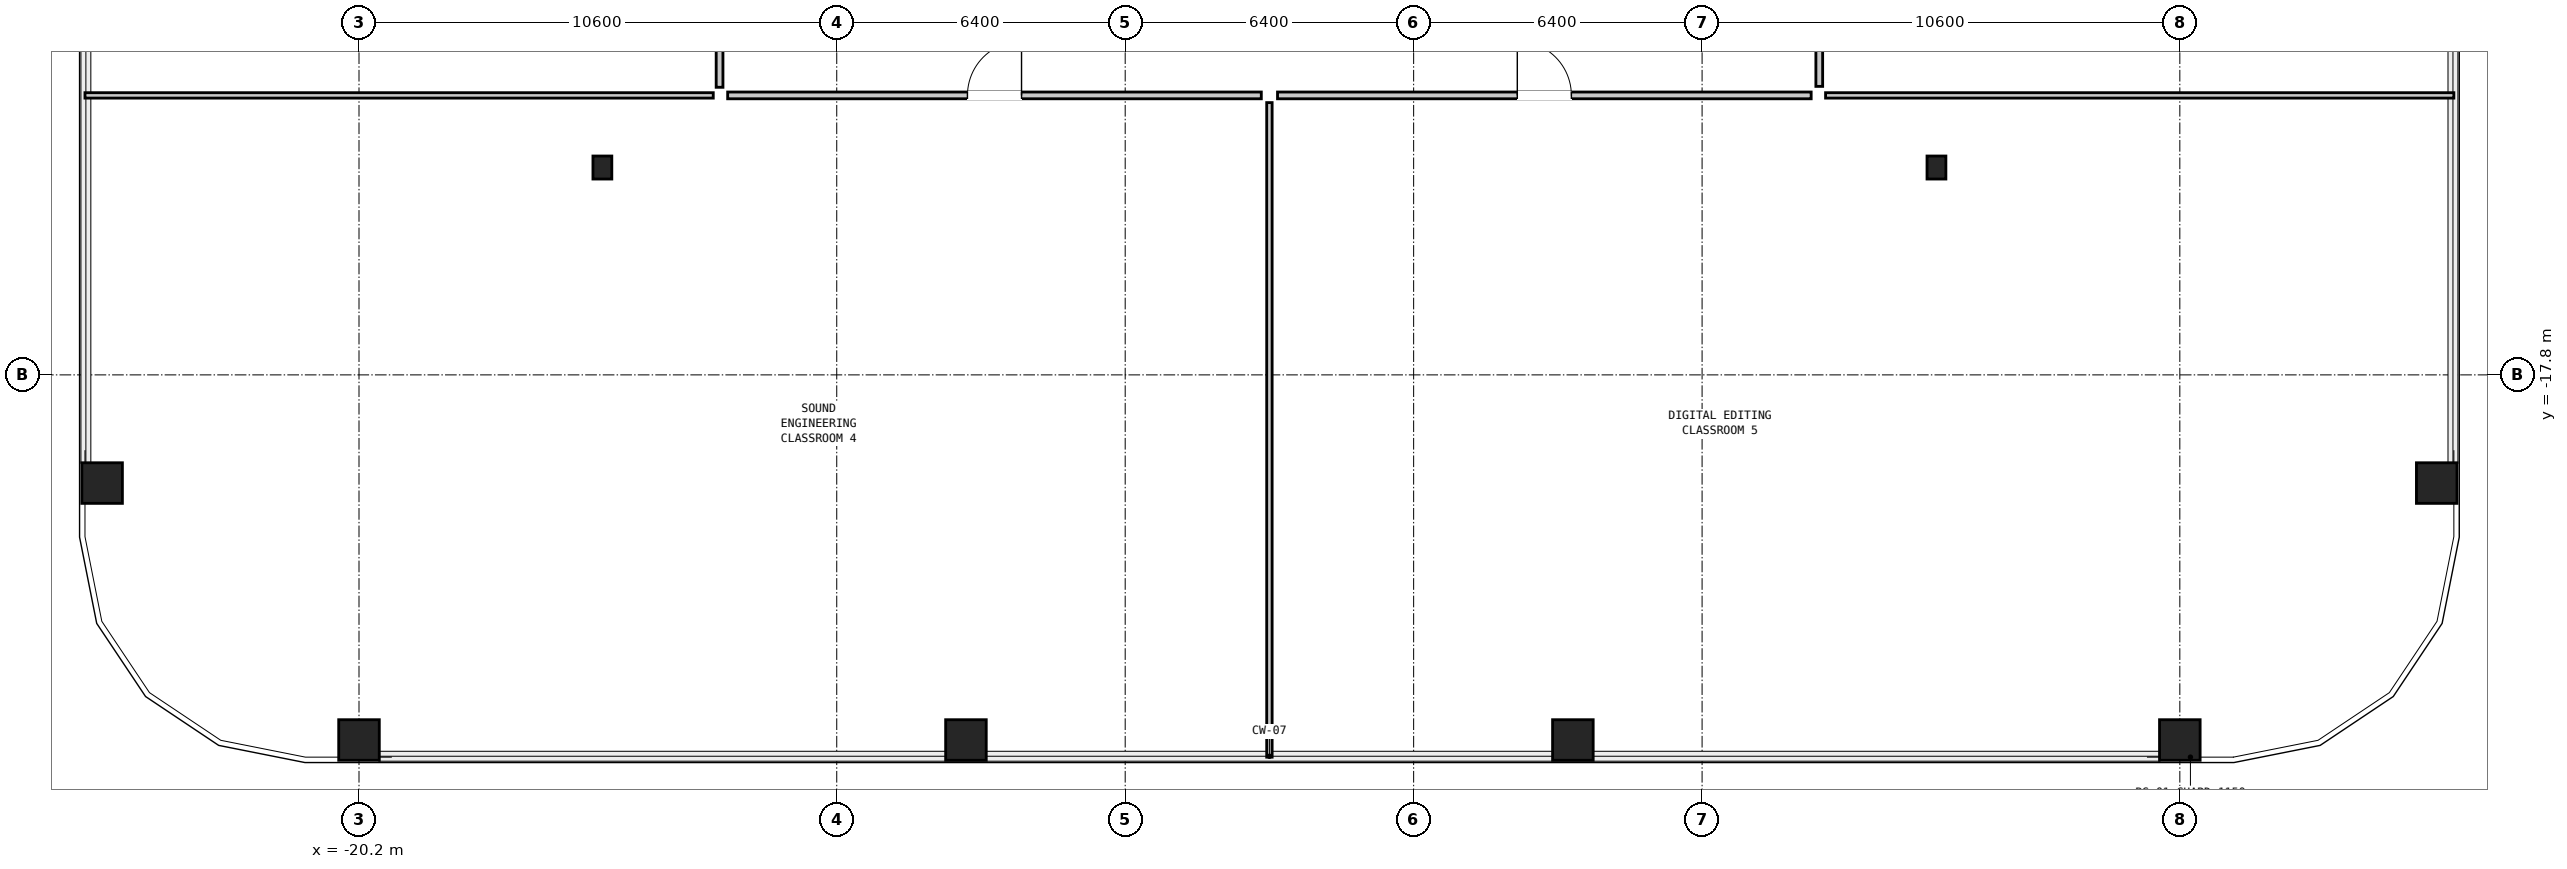
"""IFC4 building model, lengths in metres.
Left out: names, types, materials, properties, quantities, classifications, styles, units other than length and angle.
Written with IfcOpenShell. Run it as: python <this file> out.ifc"""

import sys

from ifc_helpers import new_model, si_unit, direction, frame, frame_2d, origin, origin_2d, place, context, subcontext, project, spatial, rectangle, hollow_rectangle, i_section, extrude, element, fill, save


model = new_model("IFC4")
c1 = context("Model", 3, precision=1e-05, world=origin(), true_north=direction((0.0, 1.0)))
c2 = subcontext(c1, "Body", "Model", "MODEL_VIEW")
j1 = project(units=[si_unit("LENGTHUNIT", "METRE"), si_unit("PLANEANGLEUNIT", "RADIAN")], contexts=[c1])
p1 = place(None, origin())
s1 = spatial("IfcSite", under=j1, at=p1, CompositionType="ELEMENT")
p2 = place(p1, origin())
s2 = spatial("IfcBuilding", under=s1, at=p2, CompositionType="ELEMENT")
p3 = place(p2, frame((0.0, 0.0, 53.55)))
s3 = spatial("IfcBuildingStorey", under=s2, at=p3, CompositionType="ELEMENT", Elevation=53.55)
for number, where, z_axis, x_axis in (
    (1, (-20.2, -25.9, 0.0), (0.0, 0.0, 1.0), (1.0, 0.0, 0.0)),
    (2, (-6.733, -25.9, 0.0), (0.0, 0.0, 1.0), (1.0, 0.0, 0.0)),
    (3, (6.733, -25.9, 0.0), (0.0, 0.0, 1.0), (1.0, 0.0, 0.0)),
    (4, (20.2, -25.9, 0.0), (0.0, 0.0, 1.0), (1.0, 0.0, 0.0)),
    (5, (25.9, -20.2, 0.0), (0.0, 0.0, 1.0), (0.0, 1.0, 0.0)),
    (6, (-25.9, -20.2, 0.0), (0.0, 0.0, 1.0), (0.0, 1.0, 0.0)),
):
    element("IfcColumn", number, at=place(p3, frame(where, z_axis=z_axis, x_axis=x_axis)), inside=s3, PredefinedType="COLUMN", context=c2, shape_type="SweptSolid", body=[
        extrude(hollow_rectangle(XDim=0.9, YDim=0.9, WallThickness=0.055, at=origin_2d()), origin(), (0.0, 0.0, 1.0), 4.35),
    ])
for number, where, z_axis, x_axis in (
    (7, (-14.8, -13.2, 0.0), (0.0, 0.0, 1.0), (1.0, 0.0, 0.0)),
    (8, (14.8, -13.2, 0.0), (0.0, 0.0, 1.0), (1.0, 0.0, 0.0)),
):
    element("IfcColumn", number, at=place(p3, frame(where, z_axis=z_axis, x_axis=x_axis)), inside=s3, PredefinedType="COLUMN", context=c2, shape_type="SweptSolid", body=[
        extrude(i_section(OverallWidth=0.418, OverallDepth=0.51, WebThickness=0.042, FlangeThickness=0.068, at=origin_2d()), origin(), (0.0, 0.0, 1.0), 4.35),
    ])
for number, where, z_axis, x_axis in (
    (9, (-26.28, -11.6, 0.0), (0.0, 0.0, 1.0), (1.0, 0.0, 0.0)),
    (10, (12.34, -11.6, 0.0), (0.0, 0.0, 1.0), (1.0, 0.0, 0.0)),
):
    element("IfcWall", number, at=place(p3, frame(where, z_axis=z_axis, x_axis=x_axis)), inside=s3, PredefinedType="PARTITIONING", context=c2, shape_type="SweptSolid", body=[
        extrude(rectangle(XDim=13.94, YDim=0.12, at=frame_2d((6.97, 0.0))), origin(), (0.0, 0.0, 1.0), 3.288),
    ])
p4 = place(p3, frame((0.0, -26.28, 0.0), z_axis=(0.0, 0.0, 1.0), x_axis=(0.0, 1.0, 0.0)))
e11 = element("IfcWall", 11, at=p4, inside=s3, PredefinedType="PARTITIONING", context=c2, shape_type="SweptSolid", body=[
    extrude(rectangle(XDim=14.52, YDim=0.12, at=frame_2d((7.26, 0.0))), origin(), (0.0, 0.0, 1.0), 2.25),
])
p5 = place(p3, frame((-12.02, -11.6, 0.0), z_axis=(0.0, 0.0, 1.0), x_axis=(1.0, 0.0, 0.0)))
e12 = element("IfcWall", 12, at=p5, inside=s3, PredefinedType="PARTITIONING", context=c2, shape_type="SweptSolid", body=[
    extrude(rectangle(XDim=11.84, YDim=0.15, at=frame_2d((5.92, 0.0))), origin(), (0.0, 0.0, 1.0), 3.288),
])
p6 = place(p5, frame((5.32, 0.0, 0.0)))
e13 = element("IfcOpeningElement", 13, at=p6, cuts=e12, PredefinedType="OPENING", context=c2, shape_type="SweptSolid", body=[
    extrude(rectangle(XDim=1.2, YDim=2.1, at=frame_2d((0.6, 1.05))), frame((0.0, 0.087, 0.0), z_axis=(0.0, -1.0, 0.0), x_axis=(1.0, 0.0, 0.0)), (0.0, 0.0, 1.0), 0.174),
])
p7 = place(p3, frame((0.18, -11.6, 0.0), z_axis=(0.0, 0.0, 1.0), x_axis=(1.0, 0.0, 0.0)))
e14 = element("IfcWall", 14, at=p7, inside=s3, PredefinedType="PARTITIONING", context=c2, shape_type="SweptSolid", body=[
    extrude(rectangle(XDim=11.84, YDim=0.15, at=frame_2d((5.92, 0.0))), origin(), (0.0, 0.0, 1.0), 3.288),
])
p8 = place(p7, frame((5.32, 0.0, 0.0)))
e15 = element("IfcOpeningElement", 15, at=p8, cuts=e14, PredefinedType="OPENING", context=c2, shape_type="SweptSolid", body=[
    extrude(rectangle(XDim=1.2, YDim=2.1, at=frame_2d((0.6, 1.05))), frame((0.0, 0.087, 0.0), z_axis=(0.0, -1.0, 0.0), x_axis=(1.0, 0.0, 0.0)), (0.0, 0.0, 1.0), 0.174),
])
p9 = place(p3, frame((-12.2, -11.42, 0.0), z_axis=(0.0, 0.0, 1.0), x_axis=(0.0, 1.0, 0.0)))
e16 = element("IfcWall", 16, at=p9, inside=s3, PredefinedType="PARTITIONING", context=c2, shape_type="SweptSolid", body=[
    extrude(rectangle(XDim=11.24, YDim=0.15, at=frame_2d((5.62, 0.0))), origin(), (0.0, 0.0, 1.0), 4.07),
])
p10 = place(p9, frame((5.02, 0.0, 0.0)))
e17 = element("IfcOpeningElement", 17, at=p10, cuts=e16, PredefinedType="OPENING", context=c2, shape_type="SweptSolid", body=[
    extrude(rectangle(XDim=1.2, YDim=2.1, at=frame_2d((0.6, 1.05))), frame((0.0, 0.087, 0.0), z_axis=(0.0, -1.0, 0.0), x_axis=(1.0, 0.0, 0.0)), (0.0, 0.0, 1.0), 0.174),
])
p11 = place(p3, frame((12.2, -11.4, 0.0), z_axis=(0.0, 0.0, 1.0), x_axis=(0.0, 1.0, 0.0)))
e18 = element("IfcWall", 18, at=p11, inside=s3, PredefinedType="PARTITIONING", context=c2, shape_type="SweptSolid", body=[
    extrude(rectangle(XDim=8.84, YDim=0.15, at=frame_2d((4.42, 0.0))), origin(), (0.0, 0.0, 1.0), 4.07),
])
p12 = place(p11, frame((3.945, 0.0, 0.0)))
e19 = element("IfcOpeningElement", 19, at=p12, cuts=e18, PredefinedType="OPENING", context=c2, shape_type="SweptSolid", body=[
    extrude(rectangle(XDim=0.95, YDim=2.1, at=frame_2d((0.475, 1.05))), frame((0.0, 0.087, 0.0), z_axis=(0.0, -1.0, 0.0), x_axis=(1.0, 0.0, 0.0)), (0.0, 0.0, 1.0), 0.174),
])
p13 = place(p6, origin())
e20 = element("IfcDoor", 20, at=p13, inside=s3, OperationType="SINGLE_SWING_RIGHT", PredefinedType="DOOR", context=c2, shape_type="SweptSolid", body=[
    extrude(rectangle(XDim=1.2, YDim=2.1, at=frame_2d((0.6, 1.05))), frame((0.0, 0.025, 0.0), z_axis=(0.0, -1.0, 0.0), x_axis=(1.0, 0.0, 0.0)), (0.0, 0.0, 1.0), 0.05),
])
fill(e13, e20)
p14 = place(p8, origin())
e21 = element("IfcDoor", 21, at=p14, inside=s3, OperationType="SINGLE_SWING_LEFT", PredefinedType="DOOR", context=c2, shape_type="SweptSolid", body=[
    extrude(rectangle(XDim=1.2, YDim=2.1, at=frame_2d((0.6, 1.05))), frame((0.0, 0.025, 0.0), z_axis=(0.0, -1.0, 0.0), x_axis=(1.0, 0.0, 0.0)), (0.0, 0.0, 1.0), 0.05),
])
fill(e15, e21)
save(model, sys.argv[1])
